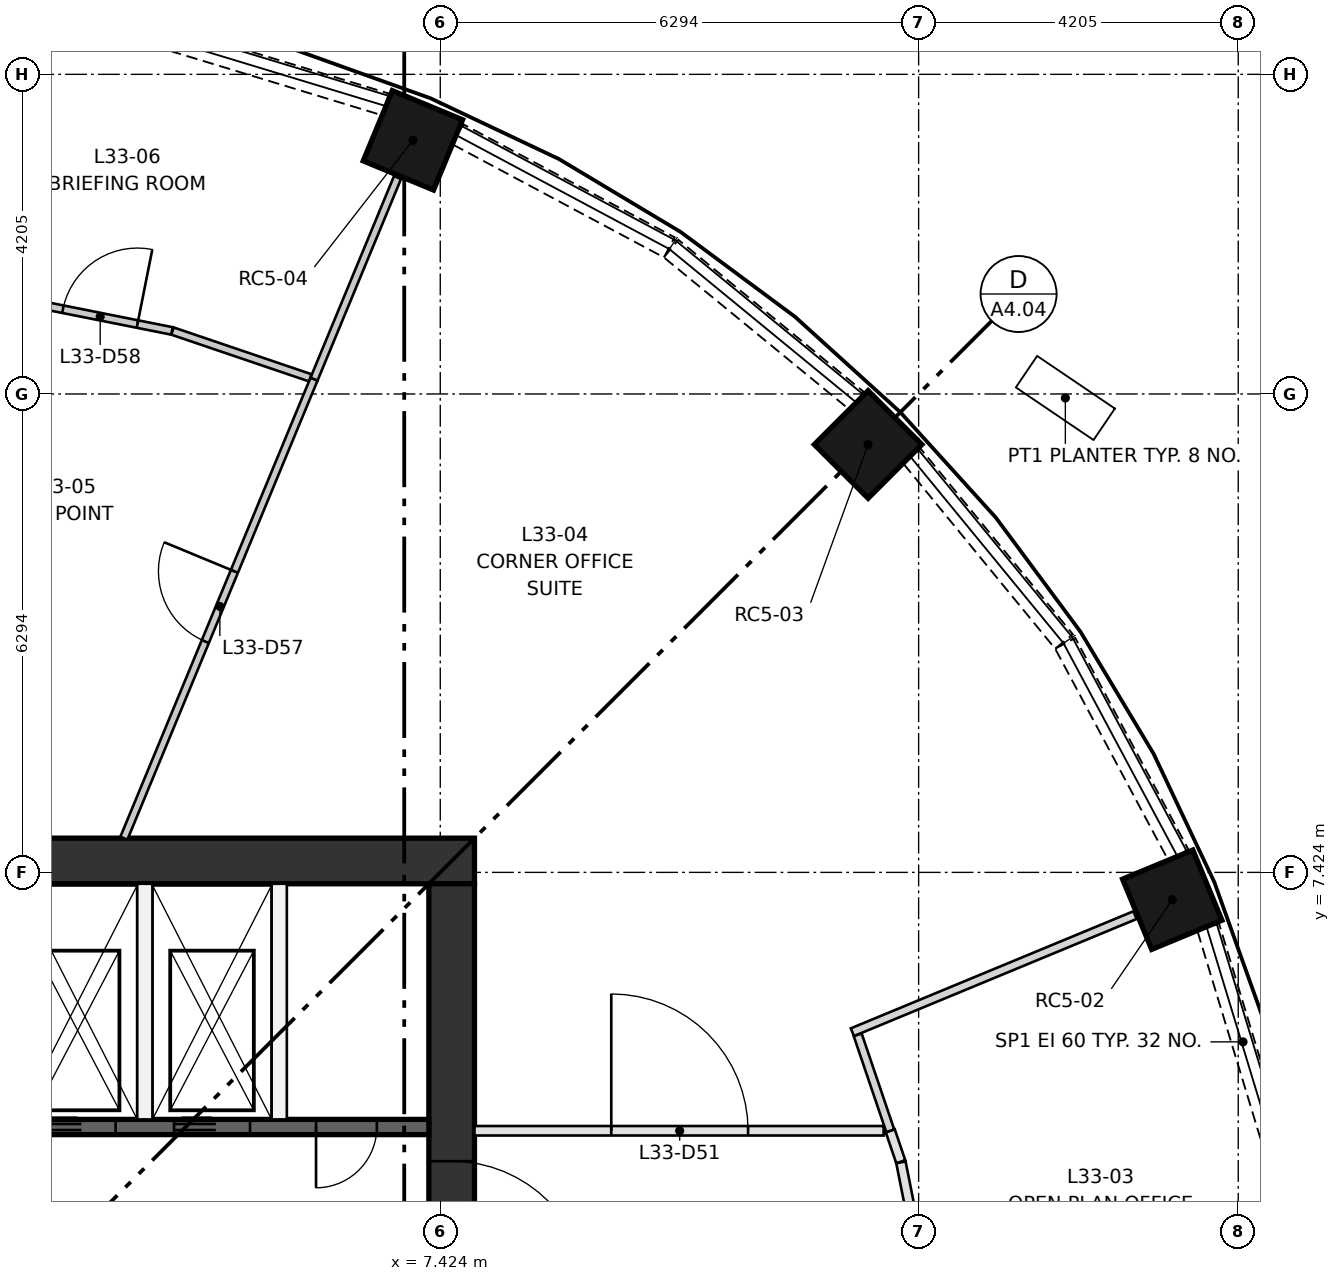
"""IFC4 building model, lengths in metres.
Left out: names, types, materials, properties, quantities, classifications, styles, units other than length and angle.
Written with IfcOpenShell. Run it as: python <this file> out.ifc"""

import sys

from ifc_helpers import new_model, si_unit, direction, frame, frame_2d, origin, origin_2d, place, context, subcontext, project, spatial, rectangle, extrude, element, fill, save


model = new_model("IFC4")
c1 = context("Model", 3, precision=1e-05, world=origin(), true_north=direction((0.0, 1.0)))
c2 = subcontext(c1, "Body", "Model", "MODEL_VIEW")
j1 = project(units=[si_unit("LENGTHUNIT", "METRE"), si_unit("PLANEANGLEUNIT", "RADIAN")], contexts=[c1])
p1 = place(None, origin())
s1 = spatial("IfcSite", under=j1, at=p1, CompositionType="ELEMENT")
p2 = place(p1, origin())
s2 = spatial("IfcBuilding", under=s1, at=p2, CompositionType="ELEMENT")
p3 = place(p2, frame((0.0, 0.0, 127.65)))
s3 = spatial("IfcBuildingStorey", under=s2, at=p3, CompositionType="ELEMENT", Elevation=127.65)
for number, where, z_axis, x_axis in (
    (1, (17.055, 7.064, 0.0), (0.0, 0.0, 1.0), (0.924, 0.383, 0.0)),
    (2, (13.053, 13.053, 0.0), (0.0, 0.0, 1.0), (0.707, 0.707, 0.0)),
    (3, (7.064, 17.055, 0.0), (0.0, 0.0, 1.0), (0.383, 0.924, 0.0)),
):
    element("IfcColumn", number, at=place(p3, frame(where, z_axis=z_axis, x_axis=x_axis)), inside=s3, PredefinedType="COLUMN", context=c2, shape_type="SweptSolid", body=[
        extrude(rectangle(XDim=1.0, YDim=1.0, at=origin_2d()), origin(), (0.0, 0.0, 1.0), 3.35),
    ])
p4 = place(p3, frame((-7.874, 7.574, 0.0), z_axis=(0.0, 0.0, 1.0), x_axis=(1.0, 0.0, 0.0)))
e4 = element("IfcWall", 4, at=p4, inside=s3, PredefinedType="SHEAR", context=c2, shape_type="SweptSolid", body=[
    extrude(rectangle(XDim=15.748, YDim=0.6, at=frame_2d((7.874, 0.0))), origin(), (0.0, 0.0, 1.0), 3.35),
])
p5 = place(p3, frame((7.574, -7.274, 0.0), z_axis=(0.0, 0.0, 1.0), x_axis=(0.0, 1.0, 0.0)))
e5 = element("IfcWall", 5, at=p5, inside=s3, PredefinedType="SHEAR", context=c2, shape_type="SweptSolid", body=[
    extrude(rectangle(XDim=14.548, YDim=0.6, at=frame_2d((7.274, 0.0))), origin(), (0.0, 0.0, 1.0), 3.35),
])
p6 = place(p5, frame((6.774, 0.0, 0.0)))
e6 = element("IfcOpeningElement", 6, at=p6, cuts=e5, PredefinedType="OPENING", context=c2, shape_type="SweptSolid", body=[
    extrude(rectangle(XDim=1.0, YDim=2.1, at=frame_2d((0.5, 1.05))), frame((0.0, 0.31, 0.0), z_axis=(0.0, -1.0, 0.0), x_axis=(1.0, 0.0, 0.0)), (0.0, 0.0, 1.0), 0.62),
])
p7 = place(p5, frame((3.649, 0.0, 0.0)))
e7 = element("IfcOpeningElement", 7, at=p7, cuts=e5, PredefinedType="OPENING", context=c2, shape_type="SweptSolid", body=[
    extrude(rectangle(XDim=1.8, YDim=2.1, at=frame_2d((0.9, 1.05))), frame((0.0, 0.31, 0.0), z_axis=(0.0, -1.0, 0.0), x_axis=(1.0, 0.0, 0.0)), (0.0, 0.0, 1.0), 0.62),
])
p8 = place(p5, frame((9.098, 0.0, 0.0)))
e8 = element("IfcOpeningElement", 8, at=p8, cuts=e5, PredefinedType="OPENING", context=c2, shape_type="SweptSolid", body=[
    extrude(rectangle(XDim=1.8, YDim=2.1, at=frame_2d((0.9, 1.05))), frame((0.0, 0.31, 0.0), z_axis=(0.0, -1.0, 0.0), x_axis=(1.0, 0.0, 0.0)), (0.0, 0.0, 1.0), 0.62),
])
p9 = place(p3, frame((0.0, 4.074, 0.0), z_axis=(0.0, 0.0, 1.0), x_axis=(1.0, 0.0, 0.0)))
e9 = element("IfcWall", 9, at=p9, inside=s3, PredefinedType="SHEAR", context=c2, shape_type="SweptSolid", body=[
    extrude(rectangle(XDim=7.274, YDim=0.2, at=frame_2d((3.637, 0.0))), origin(), (0.0, 0.0, 1.0), 3.0),
])
p10 = place(p9, frame((0.384, 0.0, 0.0)))
e10 = element("IfcOpeningElement", 10, at=p10, cuts=e9, PredefinedType="OPENING", context=c2, shape_type="SweptSolid", body=[
    extrude(rectangle(XDim=1.0, YDim=2.1, at=frame_2d((0.5, 1.05))), frame((0.0, 0.11, 0.0), z_axis=(0.0, -1.0, 0.0), x_axis=(1.0, 0.0, 0.0)), (0.0, 0.0, 1.0), 0.22),
])
p11 = place(p9, frame((2.153, 0.0, 0.0)))
e11 = element("IfcOpeningElement", 11, at=p11, cuts=e9, PredefinedType="OPENING", context=c2, shape_type="SweptSolid", body=[
    extrude(rectangle(XDim=1.0, YDim=2.1, at=frame_2d((0.5, 1.05))), frame((0.0, 0.11, 0.0), z_axis=(0.0, -1.0, 0.0), x_axis=(1.0, 0.0, 0.0)), (0.0, 0.0, 1.0), 0.22),
])
p12 = place(p9, frame((3.921, 0.0, 0.0)))
e12 = element("IfcOpeningElement", 12, at=p12, cuts=e9, PredefinedType="OPENING", context=c2, shape_type="SweptSolid", body=[
    extrude(rectangle(XDim=1.0, YDim=2.1, at=frame_2d((0.5, 1.05))), frame((0.0, 0.11, 0.0), z_axis=(0.0, -1.0, 0.0), x_axis=(1.0, 0.0, 0.0)), (0.0, 0.0, 1.0), 0.22),
])
p13 = place(p9, frame((5.79, 0.0, 0.0)))
e13 = element("IfcOpeningElement", 13, at=p13, cuts=e9, PredefinedType="OPENING", context=c2, shape_type="SweptSolid", body=[
    extrude(rectangle(XDim=0.8, YDim=2.1, at=frame_2d((0.4, 1.05))), frame((0.0, 0.11, 0.0), z_axis=(0.0, -1.0, 0.0), x_axis=(1.0, 0.0, 0.0)), (0.0, 0.0, 1.0), 0.22),
])
for number, where, z_axis, x_axis in (
    (14, (3.537, 4.174, 0.0), (0.0, 0.0, 1.0), (0.0, 1.0, 0.0)),
    (15, (5.305, 4.174, 0.0), (0.0, 0.0, 1.0), (0.0, 1.0, 0.0)),
):
    element("IfcWall", number, at=place(p3, frame(where, z_axis=z_axis, x_axis=x_axis)), inside=s3, PredefinedType="PARTITIONING", context=c2, shape_type="SweptSolid", body=[
        extrude(rectangle(XDim=3.1, YDim=0.2, at=frame_2d((1.55, 0.0))), origin(), (0.0, 0.0, 1.0), 3.0),
    ])
p14 = place(p3, frame((18.445, 3.683, 0.0), z_axis=(0.0, 0.0, 1.0), x_axis=(-0.290503096001, 0.956874051907, 0.0)))
e16 = element("IfcWall", 16, at=p14, inside=s3, PredefinedType="SOLIDWALL", context=c2, shape_type="SweptSolid", body=[
    extrude(rectangle(XDim=3.157, YDim=0.3, at=frame_2d((1.579, 0.0))), origin(), (0.0, 0.0, 1.0), 0.9),
])
p15 = place(p3, frame((17.135, 7.654, 0.0), z_axis=(0.0, 0.0, 1.0), x_axis=(-0.471527722113, 0.881851238747, 0.0)))
e17 = element("IfcWall", 17, at=p15, inside=s3, PredefinedType="SOLIDWALL", context=c2, shape_type="SweptSolid", body=[
    extrude(rectangle(XDim=3.155, YDim=0.3, at=frame_2d((1.578, 0.0))), origin(), (0.0, 0.0, 1.0), 0.9),
])
for number, where, z_axis, x_axis in (
    (18, (15.631, 10.462, 0.0), (0.0, 0.0, 1.0), (-0.634, 0.773, 0.0)),
    (19, (12.902, 13.628, 0.0), (0.0, 0.0, 1.0), (-0.773, 0.634, 0.0)),
):
    element("IfcWall", number, at=place(p3, frame(where, z_axis=z_axis, x_axis=x_axis)), inside=s3, PredefinedType="SOLIDWALL", context=c2, shape_type="SweptSolid", body=[
        extrude(rectangle(XDim=3.157, YDim=0.3, at=frame_2d((1.578, 0.0))), origin(), (0.0, 0.0, 1.0), 0.9),
    ])
p16 = place(p3, frame((10.437, 15.647, 0.0), z_axis=(0.0, 0.0, 1.0), x_axis=(-0.881851238747, 0.471527722113, 0.0)))
e20 = element("IfcWall", 20, at=p16, inside=s3, PredefinedType="SOLIDWALL", context=c2, shape_type="SweptSolid", body=[
    extrude(rectangle(XDim=3.155, YDim=0.3, at=frame_2d((1.578, 0.0))), origin(), (0.0, 0.0, 1.0), 0.9),
])
p17 = place(p3, frame((6.705, 17.527, 0.0), z_axis=(0.0, 0.0, 1.0), x_axis=(-0.956874051907, 0.290503096001, 0.0)))
e21 = element("IfcWall", 21, at=p17, inside=s3, PredefinedType="SOLIDWALL", context=c2, shape_type="SweptSolid", body=[
    extrude(rectangle(XDim=3.157, YDim=0.3, at=frame_2d((1.579, 0.0))), origin(), (0.0, 0.0, 1.0), 0.9),
])
p18 = place(p3, frame((13.345, 4.024, 0.0), z_axis=(0.0, 0.0, 1.0), x_axis=(0.321160043658, -0.947024934391, 0.0)))
e22 = element("IfcWall", 22, at=p18, inside=s3, PredefinedType="PARTITIONING", context=c2, shape_type="SweptSolid", body=[
    extrude(rectangle(XDim=0.43, YDim=0.125, at=frame_2d((0.215, 0.0))), origin(), (0.0, 0.0, 1.0), 3.0),
])
p19 = place(p3, frame((13.485, 3.609, 0.0), z_axis=(0.0, 0.0, 1.0), x_axis=(0.195134630283, -0.980776465901, 0.0)))
e23 = element("IfcWall", 23, at=p19, inside=s3, PredefinedType="PARTITIONING", context=c2, shape_type="SweptSolid", body=[
    extrude(rectangle(XDim=1.818, YDim=0.125, at=frame_2d((0.909, 0.0))), origin(), (0.0, 0.0, 1.0), 3.0),
])
p20 = place(p3, frame((7.874, 4.024, 0.0), z_axis=(0.0, 0.0, 1.0), x_axis=(1.0, 0.0, 0.0)))
e24 = element("IfcWall", 24, at=p20, inside=s3, PredefinedType="PARTITIONING", context=c2, shape_type="SweptSolid", body=[
    extrude(rectangle(XDim=5.384, YDim=0.125, at=frame_2d((2.692, 0.0))), origin(), (0.0, 0.0, 1.0), 3.0),
])
p21 = place(p20, frame((1.8, 0.0, 0.0)))
e25 = element("IfcOpeningElement", 25, at=p21, cuts=e24, PredefinedType="OPENING", context=c2, shape_type="SweptSolid", body=[
    extrude(rectangle(XDim=1.8, YDim=2.1, at=frame_2d((0.9, 1.05))), frame((0.0, 0.073, 0.0), z_axis=(0.0, -1.0, 0.0), x_axis=(1.0, 0.0, 0.0)), (0.0, 0.0, 1.0), 0.145),
])
p22 = place(p3, frame((12.847, 5.321, 0.0), z_axis=(0.0, 0.0, 1.0), x_axis=(0.923877104161, 0.382689294869, 0.0)))
e26 = element("IfcWall", 26, at=p22, inside=s3, PredefinedType="PARTITIONING", context=c2, shape_type="SweptSolid", body=[
    extrude(rectangle(XDim=4.025, YDim=0.11, at=frame_2d((2.012, 0.0))), origin(), (0.0, 0.0, 1.0), 3.0),
])
p23 = place(p3, frame((13.345, 4.024, 0.0), z_axis=(0.0, 0.0, 1.0), x_axis=(-0.32144299332, 0.946928931888, 0.0)))
e27 = element("IfcWall", 27, at=p23, inside=s3, PredefinedType="PARTITIONING", context=c2, shape_type="SweptSolid", body=[
    extrude(rectangle(XDim=1.333, YDim=0.11, at=frame_2d((0.667, 0.0))), origin(), (0.0, 0.0, 1.0), 3.0),
])
p24 = place(p3, frame((3.261, 7.874, 0.0), z_axis=(0.0, 0.0, 1.0), x_axis=(0.382689326263, 0.923877091157, 0.0)))
e28 = element("IfcWall", 28, at=p24, inside=s3, PredefinedType="PARTITIONING", context=c2, shape_type="SweptSolid", body=[
    extrude(rectangle(XDim=6.537, YDim=0.1, at=frame_2d((3.269, 0.0))), origin(), (0.0, 0.0, 1.0), 3.0),
])
p25 = place(p24, frame((2.8, 0.0, 0.0)))
e29 = element("IfcOpeningElement", 29, at=p25, cuts=e28, PredefinedType="OPENING", context=c2, shape_type="SweptSolid", body=[
    extrude(rectangle(XDim=1.0, YDim=2.1, at=frame_2d((0.5, 1.05))), frame((0.0, 0.06, 0.0), z_axis=(0.0, -1.0, 0.0), x_axis=(1.0, 0.0, 0.0)), (0.0, 0.0, 1.0), 0.12),
])
p26 = place(p3, frame((5.763, 13.914, 0.0), z_axis=(0.0, 0.0, 1.0), x_axis=(0.382699877515, 0.923872720536, 0.0)))
e30 = element("IfcWall", 30, at=p26, inside=s3, PredefinedType="PARTITIONING", context=c2, shape_type="SweptSolid", body=[
    extrude(rectangle(XDim=2.87, YDim=0.1, at=frame_2d((1.435, 0.0))), origin(), (0.0, 0.0, 1.0), 3.0),
])
p27 = place(p3, frame((1.969, 14.931, 0.0), z_axis=(0.0, 0.0, 1.0), x_axis=(0.980757237699, -0.195231249295, 0.0)))
e31 = element("IfcWall", 31, at=p27, inside=s3, PredefinedType="PARTITIONING", context=c2, shape_type="SweptSolid", body=[
    extrude(rectangle(XDim=1.963, YDim=0.1, at=frame_2d((0.982, 0.0))), origin(), (0.0, 0.0, 1.0), 3.0),
])
p28 = place(p27, frame((0.5, 0.0, 0.0)))
e32 = element("IfcOpeningElement", 32, at=p28, cuts=e31, PredefinedType="OPENING", context=c2, shape_type="SweptSolid", body=[
    extrude(rectangle(XDim=1.0, YDim=2.1, at=frame_2d((0.5, 1.05))), frame((0.0, 0.06, 0.0), z_axis=(0.0, -1.0, 0.0), x_axis=(1.0, 0.0, 0.0)), (0.0, 0.0, 1.0), 0.12),
])
p29 = place(p3, frame((3.901, 14.546, 0.0), z_axis=(0.0, 0.0, 1.0), x_axis=(0.946972460269, -0.321314735879, 0.0)))
e33 = element("IfcWall", 33, at=p29, inside=s3, PredefinedType="PARTITIONING", context=c2, shape_type="SweptSolid", body=[
    extrude(rectangle(XDim=1.913, YDim=0.1, at=frame_2d((0.957, 0.0))), origin(), (0.0, 0.0, 1.0), 3.0),
])
p30 = place(p11, frame((1.0, 0.0, 0.0), z_axis=(0.0, 0.0, 1.0), x_axis=(-1.0, 0.0, 0.0)))
e34 = element("IfcDoor", 34, at=p30, inside=s3, OperationType="DOUBLE_DOOR_SLIDING", PredefinedType="DOOR", context=c2, shape_type="SweptSolid", body=[
    extrude(rectangle(XDim=1.0, YDim=2.1, at=frame_2d((0.5, 1.05))), frame((0.0, 0.025, 0.0), z_axis=(0.0, -1.0, 0.0), x_axis=(1.0, 0.0, 0.0)), (0.0, 0.0, 1.0), 0.05),
])
fill(e11, e34)
p31 = place(p12, frame((1.0, 0.0, 0.0), z_axis=(0.0, 0.0, 1.0), x_axis=(-1.0, 0.0, 0.0)))
e35 = element("IfcDoor", 35, at=p31, inside=s3, OperationType="DOUBLE_DOOR_SLIDING", PredefinedType="DOOR", context=c2, shape_type="SweptSolid", body=[
    extrude(rectangle(XDim=1.0, YDim=2.1, at=frame_2d((0.5, 1.05))), frame((0.0, 0.025, 0.0), z_axis=(0.0, -1.0, 0.0), x_axis=(1.0, 0.0, 0.0)), (0.0, 0.0, 1.0), 0.05),
])
fill(e12, e35)
p32 = place(p13, frame((0.8, 0.0, 0.0), z_axis=(0.0, 0.0, 1.0), x_axis=(-1.0, 0.0, 0.0)))
e36 = element("IfcDoor", 36, at=p32, inside=s3, OperationType="SINGLE_SWING_LEFT", PredefinedType="DOOR", context=c2, shape_type="SweptSolid", body=[
    extrude(rectangle(XDim=0.8, YDim=2.1, at=frame_2d((0.4, 1.05))), frame((0.0, 0.025, 0.0), z_axis=(0.0, -1.0, 0.0), x_axis=(1.0, 0.0, 0.0)), (0.0, 0.0, 1.0), 0.05),
])
fill(e13, e36)
p33 = place(p8, frame((1.8, 0.0, 0.0), z_axis=(0.0, 0.0, 1.0), x_axis=(-1.0, 0.0, 0.0)))
e37 = element("IfcDoor", 37, at=p33, inside=s3, OperationType="DOUBLE_DOOR_SINGLE_SWING", PredefinedType="DOOR", context=c2, shape_type="SweptSolid", body=[
    extrude(rectangle(XDim=1.8, YDim=2.1, at=frame_2d((0.9, 1.05))), frame((0.0, 0.025, 0.0), z_axis=(0.0, -1.0, 0.0), x_axis=(1.0, 0.0, 0.0)), (0.0, 0.0, 1.0), 0.05),
])
fill(e8, e37)
p34 = place(p21, origin())
e38 = element("IfcDoor", 38, at=p34, inside=s3, OperationType="DOUBLE_DOOR_SINGLE_SWING", PredefinedType="DOOR", context=c2, shape_type="SweptSolid", body=[
    extrude(rectangle(XDim=1.8, YDim=2.1, at=frame_2d((0.9, 1.05))), frame((0.0, 0.025, 0.0), z_axis=(0.0, -1.0, 0.0), x_axis=(1.0, 0.0, 0.0)), (0.0, 0.0, 1.0), 0.05),
])
fill(e25, e38)
p35 = place(p25, origin())
e39 = element("IfcDoor", 39, at=p35, inside=s3, OperationType="SINGLE_SWING_RIGHT", PredefinedType="DOOR", context=c2, shape_type="SweptSolid", body=[
    extrude(rectangle(XDim=1.0, YDim=2.1, at=frame_2d((0.5, 1.05))), frame((0.0, 0.025, 0.0), z_axis=(0.0, -1.0, 0.0), x_axis=(1.0, 0.0, 0.0)), (0.0, 0.0, 1.0), 0.05),
])
fill(e29, e39)
p36 = place(p28, origin())
e40 = element("IfcDoor", 40, at=p36, inside=s3, OperationType="SINGLE_SWING_RIGHT", PredefinedType="DOOR", context=c2, shape_type="SweptSolid", body=[
    extrude(rectangle(XDim=1.0, YDim=2.1, at=frame_2d((0.5, 1.05))), frame((0.0, 0.025, 0.0), z_axis=(0.0, -1.0, 0.0), x_axis=(1.0, 0.0, 0.0)), (0.0, 0.0, 1.0), 0.05),
])
fill(e32, e40)
save(model, sys.argv[1])
